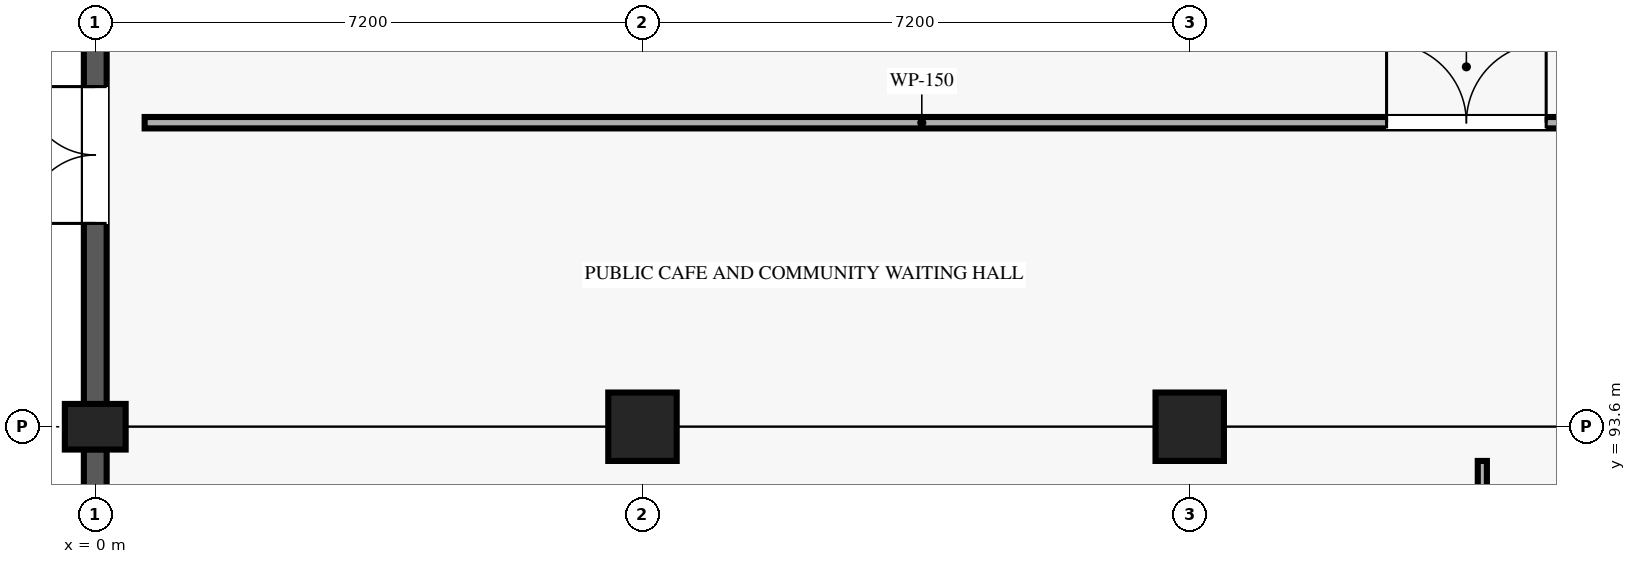
"""IFC4 building model, lengths in metres.
Left out: names, types, materials, properties, quantities, classifications, styles, units other than length and angle.
Written with IfcOpenShell. Run it as: python <this file> out.ifc"""

import sys

from ifc_helpers import new_model, si_unit, direction, frame, frame_2d, origin, origin_2d, place, context, subcontext, project, spatial, rectangle, extrude, element, fill, save


model = new_model("IFC4")
c1 = context("Model", 3, precision=1e-05, world=origin(), true_north=direction((0.0, 1.0)))
c2 = subcontext(c1, "Body", "Model", "MODEL_VIEW")
j1 = project(units=[si_unit("LENGTHUNIT", "METRE"), si_unit("PLANEANGLEUNIT", "RADIAN")], contexts=[c1])
p1 = place(None, origin())
s1 = spatial("IfcSite", under=j1, at=p1, CompositionType="ELEMENT")
p2 = place(p1, origin())
s2 = spatial("IfcBuilding", under=s1, at=p2, CompositionType="ELEMENT")
p3 = place(p2, origin())
s3 = spatial("IfcBuildingStorey", under=s2, at=p3, CompositionType="ELEMENT", Elevation=0.0)
p4 = place(p3, frame((0.0, 93.6, 0.0), z_axis=(0.0, 0.0, 1.0), x_axis=(0.0, 1.0, 0.0)))
e1 = element("IfcColumn", 1, at=p4, inside=s3, PredefinedType="COLUMN", context=c2, shape_type="SweptSolid", body=[
    extrude(rectangle(XDim=0.6, YDim=0.8, at=origin_2d()), origin(), (0.0, 0.0, 1.0), 5.4),
])
for number, where, z_axis, x_axis in (
    (2, (7.2, 93.6, 0.0), (0.0, 0.0, 1.0), (1.0, 0.0, 0.0)),
    (3, (14.4, 93.6, 0.0), (0.0, 0.0, 1.0), (1.0, 0.0, 0.0)),
):
    element("IfcColumn", number, at=place(p3, frame(where, z_axis=z_axis, x_axis=x_axis)), inside=s3, PredefinedType="COLUMN", context=c2, shape_type="SweptSolid", body=[
        extrude(rectangle(XDim=0.9, YDim=0.9, at=origin_2d()), origin(), (0.0, 0.0, 1.0), 5.4),
    ])
p5 = place(p3, frame((0.0, 86.695, 0.0), z_axis=(0.0, 0.0, 1.0), x_axis=(0.0, 1.0, 0.0)))
e4 = element("IfcWall", 4, at=p5, inside=s3, PredefinedType="SOLIDWALL", context=c2, shape_type="SweptSolid", body=[
    extrude(rectangle(XDim=6.61, YDim=0.3, at=frame_2d((3.305, 0.0))), origin(), (0.0, 0.0, 1.0), 5.16),
])
p6 = place(p5, frame((2.605, 0.0, 0.85)))
e5 = element("IfcOpeningElement", 5, at=p6, cuts=e4, PredefinedType="OPENING", context=c2, shape_type="SweptSolid", body=[
    extrude(rectangle(XDim=1.4, YDim=1.6, at=frame_2d((0.7, 0.8))), frame((0.0, 0.16, 0.0), z_axis=(0.0, -1.0, 0.0), x_axis=(1.0, 0.0, 0.0)), (0.0, 0.0, 1.0), 0.32),
])
p7 = place(p3, frame((0.0, 93.895, 0.0), z_axis=(0.0, 0.0, 1.0), x_axis=(0.0, 1.0, 0.0)))
e6 = element("IfcWall", 6, at=p7, inside=s3, PredefinedType="SOLIDWALL", context=c2, shape_type="SweptSolid", body=[
    extrude(rectangle(XDim=6.56, YDim=0.3, at=frame_2d((3.28, 0.0))), origin(), (0.0, 0.0, 1.0), 5.16),
])
p8 = place(p7, frame((2.38, 0.0, 0.0)))
e7 = element("IfcOpeningElement", 7, at=p8, cuts=e6, PredefinedType="OPENING", context=c2, shape_type="SweptSolid", body=[
    extrude(rectangle(XDim=1.8, YDim=2.2, at=frame_2d((0.9, 1.1))), frame((0.0, 0.16, 0.0), z_axis=(0.0, -1.0, 0.0), x_axis=(1.0, 0.0, 0.0)), (0.0, 0.0, 1.0), 0.32),
])
p9 = place(p3, frame((0.65, 97.6, 0.0), z_axis=(0.0, 0.0, 1.0), x_axis=(1.0, 0.0, 0.0)))
e8 = element("IfcWall", 8, at=p9, inside=s3, PredefinedType="PARTITIONING", context=c2, shape_type="SweptSolid", body=[
    extrude(rectangle(XDim=20.45, YDim=0.15, at=frame_2d((10.225, 0.0))), origin(), (0.0, 0.0, 1.0), 5.16),
])
p10 = place(p9, frame((16.34, 0.0, 0.0)))
e9 = element("IfcOpeningElement", 9, at=p10, cuts=e8, PredefinedType="OPENING", context=c2, shape_type="SweptSolid", body=[
    extrude(rectangle(XDim=2.1, YDim=2.4, at=frame_2d((1.05, 1.2))), frame((0.0, 0.085, 0.0), z_axis=(0.0, -1.0, 0.0), x_axis=(1.0, 0.0, 0.0)), (0.0, 0.0, 1.0), 0.17),
])
p11 = place(p3, frame((18.25, 72.6, 0.0), z_axis=(0.0, 0.0, 1.0), x_axis=(0.0, 1.0, 0.0)))
e10 = element("IfcWall", 10, at=p11, inside=s3, PredefinedType="PARTITIONING", context=c2, shape_type="SweptSolid", body=[
    extrude(rectangle(XDim=20.55, YDim=0.12, at=frame_2d((10.275, 0.0))), origin(), (0.0, 0.0, 1.0), 5.16),
])
p12 = place(p11, frame((2.504, 0.0, 0.0)))
e11 = element("IfcOpeningElement", 11, at=p12, cuts=e10, PredefinedType="OPENING", context=c2, shape_type="SweptSolid", body=[
    extrude(rectangle(XDim=1.02, YDim=2.15, at=frame_2d((0.51, 1.075))), frame((0.0, 0.07, 0.0), z_axis=(0.0, -1.0, 0.0), x_axis=(1.0, 0.0, 0.0)), (0.0, 0.0, 1.0), 0.14),
])
p13 = place(p8, origin())
e12 = element("IfcDoor", 12, at=p13, inside=s3, OperationType="DOUBLE_DOOR_SINGLE_SWING", PredefinedType="DOOR", context=c2, shape_type="SweptSolid", body=[
    extrude(rectangle(XDim=1.8, YDim=2.2, at=frame_2d((0.9, 1.1))), frame((0.0, 0.025, 0.0), z_axis=(0.0, -1.0, 0.0), x_axis=(1.0, 0.0, 0.0)), (0.0, 0.0, 1.0), 0.05),
])
fill(e7, e12)
p14 = place(p10, origin())
e13 = element("IfcDoor", 13, at=p14, inside=s3, OperationType="DOUBLE_DOOR_SINGLE_SWING", PredefinedType="DOOR", context=c2, shape_type="SweptSolid", body=[
    extrude(rectangle(XDim=2.1, YDim=2.4, at=frame_2d((1.05, 1.2))), frame((0.0, 0.025, 0.0), z_axis=(0.0, -1.0, 0.0), x_axis=(1.0, 0.0, 0.0)), (0.0, 0.0, 1.0), 0.05),
])
fill(e9, e13)
save(model, sys.argv[1])
